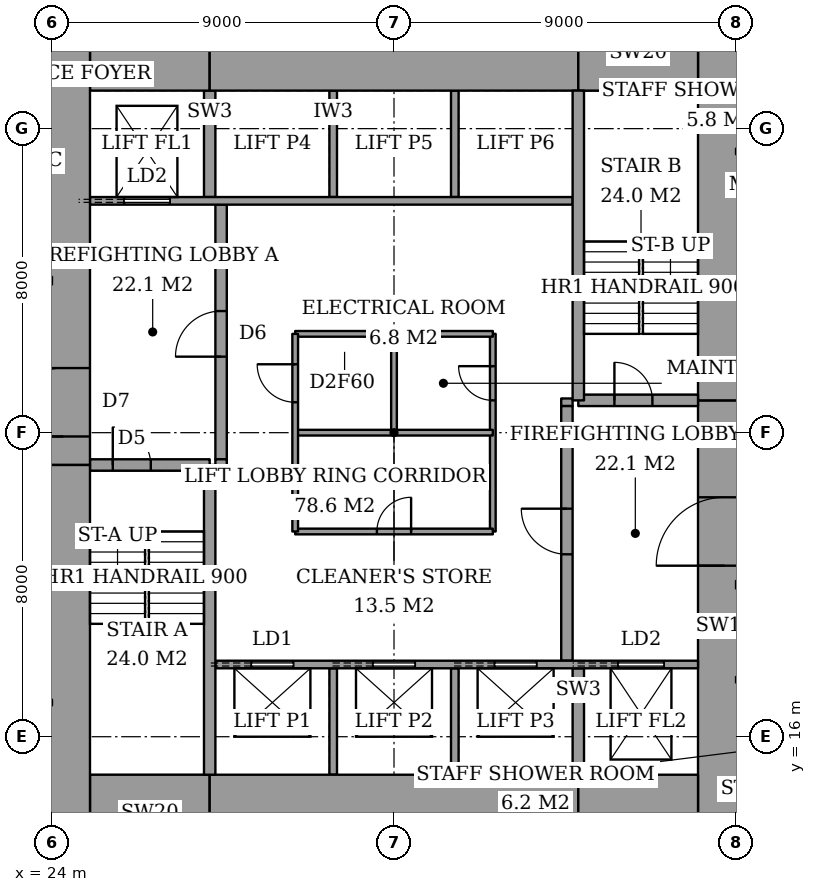
"""IFC4 building model, lengths in metres.
Left out: names, types, materials, properties, quantities, classifications, styles, units other than length and angle.
Written with IfcOpenShell. Run it as: python <this file> out.ifc"""

import sys

from ifc_helpers import new_model, si_unit, direction, frame, frame_2d, origin, place, context, subcontext, project, spatial, rectangle, extrude, element, fill, save


model = new_model("IFC4")
c1 = context("Model", 3, precision=1e-05, world=origin(), true_north=direction((0.0, 1.0)))
c2 = subcontext(c1, "Body", "Model", "MODEL_VIEW")
j1 = project(units=[si_unit("LENGTHUNIT", "METRE"), si_unit("PLANEANGLEUNIT", "RADIAN")], contexts=[c1])
p1 = place(None, origin())
s1 = spatial("IfcSite", under=j1, at=p1, CompositionType="ELEMENT")
p2 = place(p1, origin())
s2 = spatial("IfcBuilding", under=s1, at=p2, CompositionType="ELEMENT")
p3 = place(p2, frame((0.0, 0.0, 164.6)))
s3 = spatial("IfcBuildingStorey", under=s2, at=p3, CompositionType="ELEMENT", Elevation=164.6)
p4 = place(p3, frame((25.0, 14.0, 0.0), z_axis=(0.0, 0.0, 1.0), x_axis=(1.0, 0.0, 0.0)))
e1 = element("IfcWall", 1, at=p4, inside=s3, PredefinedType="SHEAR", context=c2, shape_type="SweptSolid", body=[
    extrude(rectangle(XDim=3.15, YDim=2.0, at=frame_2d((1.575, 0.0))), origin(), (0.0, 0.0, 1.0), 3.6),
])
p5 = place(p3, frame((28.15, 14.0, 0.0), z_axis=(0.0, 0.0, 1.0), x_axis=(1.0, 0.0, 0.0)))
e2 = element("IfcWall", 2, at=p5, inside=s3, PredefinedType="SHEAR", context=c2, shape_type="SweptSolid", body=[
    extrude(rectangle(XDim=9.7, YDim=2.0, at=frame_2d((4.85, 0.0))), origin(), (0.0, 0.0, 1.0), 3.6),
])
for number, where, z_axis, x_axis in (
    (3, (37.85, 14.0, 0.0), (0.0, 0.0, 1.0), (1.0, 0.0, 0.0)),
    (4, (25.0, 34.0, 0.0), (0.0, 0.0, 1.0), (1.0, 0.0, 0.0)),
):
    element("IfcWall", number, at=place(p3, frame(where, z_axis=z_axis, x_axis=x_axis)), inside=s3, PredefinedType="SHEAR", context=c2, shape_type="SweptSolid", body=[
        extrude(rectangle(XDim=3.15, YDim=2.0, at=frame_2d((1.575, 0.0))), origin(), (0.0, 0.0, 1.0), 3.6),
    ])
p6 = place(p3, frame((28.15, 34.0, 0.0), z_axis=(0.0, 0.0, 1.0), x_axis=(1.0, 0.0, 0.0)))
e5 = element("IfcWall", 5, at=p6, inside=s3, PredefinedType="SHEAR", context=c2, shape_type="SweptSolid", body=[
    extrude(rectangle(XDim=9.7, YDim=2.0, at=frame_2d((4.85, 0.0))), origin(), (0.0, 0.0, 1.0), 3.6),
])
p7 = place(p3, frame((37.85, 34.0, 0.0), z_axis=(0.0, 0.0, 1.0), x_axis=(1.0, 0.0, 0.0)))
e6 = element("IfcWall", 6, at=p7, inside=s3, PredefinedType="SHEAR", context=c2, shape_type="SweptSolid", body=[
    extrude(rectangle(XDim=3.15, YDim=2.0, at=frame_2d((1.575, 0.0))), origin(), (0.0, 0.0, 1.0), 3.6),
])
p8 = place(p3, frame((24.3, 13.0, 0.0), z_axis=(0.0, 0.0, 1.0), x_axis=(0.0, 1.0, 0.0)))
e7 = element("IfcWall", 7, at=p8, inside=s3, PredefinedType="SHEAR", context=c2, shape_type="SweptSolid", body=[
    extrude(rectangle(XDim=10.15, YDim=1.4, at=frame_2d((5.075, 0.0))), origin(), (0.0, 0.0, 1.0), 3.6),
])
p9 = place(p3, frame((24.3, 23.15, 0.0), z_axis=(0.0, 0.0, 1.0), x_axis=(0.0, 1.0, 0.0)))
e8 = element("IfcWall", 8, at=p9, inside=s3, PredefinedType="SHEAR", context=c2, shape_type="SweptSolid", body=[
    extrude(rectangle(XDim=11.85, YDim=1.4, at=frame_2d((5.925, 0.0))), origin(), (0.0, 0.0, 1.0), 3.6),
])
p10 = place(p9, frame((0.75, 0.0, 0.0)))
e9 = element("IfcOpeningElement", 9, at=p10, cuts=e8, PredefinedType="OPENING", context=c2, shape_type="SweptSolid", body=[
    extrude(rectangle(XDim=1.8, YDim=2.4, at=frame_2d((0.9, 1.2))), frame((0.0, 0.71, 0.0), z_axis=(0.0, -1.0, 0.0), x_axis=(1.0, 0.0, 0.0)), (0.0, 0.0, 1.0), 1.42),
])
p11 = place(p3, frame((41.7, 13.0, 0.0), z_axis=(0.0, 0.0, 1.0), x_axis=(0.0, 1.0, 0.0)))
e10 = element("IfcWall", 10, at=p11, inside=s3, PredefinedType="SHEAR", context=c2, shape_type="SweptSolid", body=[
    extrude(rectangle(XDim=11.85, YDim=1.4, at=frame_2d((5.925, 0.0))), origin(), (0.0, 0.0, 1.0), 3.6),
])
p12 = place(p11, frame((7.5, 0.0, 0.0)))
e11 = element("IfcOpeningElement", 11, at=p12, cuts=e10, PredefinedType="OPENING", context=c2, shape_type="SweptSolid", body=[
    extrude(rectangle(XDim=1.8, YDim=2.4, at=frame_2d((0.9, 1.2))), frame((0.0, 0.71, 0.0), z_axis=(0.0, -1.0, 0.0), x_axis=(1.0, 0.0, 0.0)), (0.0, 0.0, 1.0), 1.42),
])
p13 = place(p3, frame((41.7, 24.85, 0.0), z_axis=(0.0, 0.0, 1.0), x_axis=(0.0, 1.0, 0.0)))
e12 = element("IfcWall", 12, at=p13, inside=s3, PredefinedType="SHEAR", context=c2, shape_type="SweptSolid", body=[
    extrude(rectangle(XDim=10.15, YDim=1.4, at=frame_2d((5.075, 0.0))), origin(), (0.0, 0.0, 1.0), 3.6),
])
p14 = place(p3, frame((28.15, 15.0, 0.0), z_axis=(0.0, 0.0, 1.0), x_axis=(0.0, 1.0, 0.0)))
e13 = element("IfcWall", 13, at=p14, inside=s3, PredefinedType="SHEAR", context=c2, shape_type="SweptSolid", body=[
    extrude(rectangle(XDim=8.15, YDim=0.3, at=frame_2d((4.075, 0.0))), origin(), (0.0, 0.0, 1.0), 3.6),
])
p15 = place(p3, frame((25.0, 23.15, 0.0), z_axis=(0.0, 0.0, 1.0), x_axis=(1.0, 0.0, 0.0)))
e14 = element("IfcWall", 14, at=p15, inside=s3, PredefinedType="SHEAR", context=c2, shape_type="SweptSolid", body=[
    extrude(rectangle(XDim=3.15, YDim=0.3, at=frame_2d((1.575, 0.0))), origin(), (0.0, 0.0, 1.0), 3.6),
])
p16 = place(p15, frame((0.6, 0.0, 0.0)))
e15 = element("IfcOpeningElement", 15, at=p16, cuts=e14, PredefinedType="OPENING", context=c2, shape_type="SweptSolid", body=[
    extrude(rectangle(XDim=1.0, YDim=2.1, at=frame_2d((0.5, 1.05))), frame((0.0, 0.16, 0.0), z_axis=(0.0, -1.0, 0.0), x_axis=(1.0, 0.0, 0.0)), (0.0, 0.0, 1.0), 0.32),
])
p17 = place(p3, frame((37.85, 24.85, 0.0), z_axis=(0.0, 0.0, 1.0), x_axis=(0.0, 1.0, 0.0)))
e16 = element("IfcWall", 16, at=p17, inside=s3, PredefinedType="SHEAR", context=c2, shape_type="SweptSolid", body=[
    extrude(rectangle(XDim=8.15, YDim=0.3, at=frame_2d((4.075, 0.0))), origin(), (0.0, 0.0, 1.0), 3.6),
])
p18 = place(p3, frame((37.85, 24.85, 0.0), z_axis=(0.0, 0.0, 1.0), x_axis=(1.0, 0.0, 0.0)))
e17 = element("IfcWall", 17, at=p18, inside=s3, PredefinedType="SHEAR", context=c2, shape_type="SweptSolid", body=[
    extrude(rectangle(XDim=3.15, YDim=0.3, at=frame_2d((1.575, 0.0))), origin(), (0.0, 0.0, 1.0), 3.6),
])
p19 = place(p18, frame((0.95, 0.0, 0.0)))
e18 = element("IfcOpeningElement", 18, at=p19, cuts=e17, PredefinedType="OPENING", context=c2, shape_type="SweptSolid", body=[
    extrude(rectangle(XDim=1.0, YDim=2.1, at=frame_2d((0.5, 1.05))), frame((0.0, 0.16, 0.0), z_axis=(0.0, -1.0, 0.0), x_axis=(1.0, 0.0, 0.0)), (0.0, 0.0, 1.0), 0.32),
])
p20 = place(p3, frame((28.45, 23.3, 0.0), z_axis=(0.0, 0.0, 1.0), x_axis=(0.0, 1.0, 0.0)))
e19 = element("IfcWall", 19, at=p20, inside=s3, PredefinedType="PARTITIONING", context=c2, shape_type="SweptSolid", body=[
    extrude(rectangle(XDim=6.7, YDim=0.3, at=frame_2d((3.35, 0.0))), origin(), (0.0, 0.0, 1.0), 3.6),
])
p21 = place(p20, frame((2.7, 0.0, 0.0)))
e20 = element("IfcOpeningElement", 20, at=p21, cuts=e19, PredefinedType="OPENING", context=c2, shape_type="SweptSolid", body=[
    extrude(rectangle(XDim=1.2, YDim=2.1, at=frame_2d((0.6, 1.05))), frame((0.0, 0.16, 0.0), z_axis=(0.0, -1.0, 0.0), x_axis=(1.0, 0.0, 0.0)), (0.0, 0.0, 1.0), 0.32),
])
p22 = place(p3, frame((37.55, 18.0, 0.0), z_axis=(0.0, 0.0, 1.0), x_axis=(0.0, 1.0, 0.0)))
e21 = element("IfcWall", 21, at=p22, inside=s3, PredefinedType="PARTITIONING", context=c2, shape_type="SweptSolid", body=[
    extrude(rectangle(XDim=6.7, YDim=0.3, at=frame_2d((3.35, 0.0))), origin(), (0.0, 0.0, 1.0), 3.6),
])
p23 = place(p22, frame((2.8, 0.0, 0.0)))
e22 = element("IfcOpeningElement", 22, at=p23, cuts=e21, PredefinedType="OPENING", context=c2, shape_type="SweptSolid", body=[
    extrude(rectangle(XDim=1.2, YDim=2.1, at=frame_2d((0.6, 1.05))), frame((0.0, 0.16, 0.0), z_axis=(0.0, -1.0, 0.0), x_axis=(1.0, 0.0, 0.0)), (0.0, 0.0, 1.0), 0.32),
])
p24 = place(p3, frame((28.3, 17.9, 0.0), z_axis=(0.0, 0.0, 1.0), x_axis=(1.0, 0.0, 0.0)))
e23 = element("IfcWall", 23, at=p24, inside=s3, PredefinedType="PARTITIONING", context=c2, shape_type="SweptSolid", body=[
    extrude(rectangle(XDim=12.7, YDim=0.2, at=frame_2d((6.35, 0.0))), origin(), (0.0, 0.0, 1.0), 3.6),
])
p25 = place(p24, frame((0.95, 0.0, 0.0)))
e24 = element("IfcOpeningElement", 24, at=p25, cuts=e23, PredefinedType="OPENING", context=c2, shape_type="SweptSolid", body=[
    extrude(rectangle(XDim=1.1, YDim=2.1, at=frame_2d((0.55, 1.05))), frame((0.0, 0.11, 0.0), z_axis=(0.0, -1.0, 0.0), x_axis=(1.0, 0.0, 0.0)), (0.0, 0.0, 1.0), 0.22),
])
p26 = place(p24, frame((4.15, 0.0, 0.0)))
e25 = element("IfcOpeningElement", 25, at=p26, cuts=e23, PredefinedType="OPENING", context=c2, shape_type="SweptSolid", body=[
    extrude(rectangle(XDim=1.1, YDim=2.1, at=frame_2d((0.55, 1.05))), frame((0.0, 0.11, 0.0), z_axis=(0.0, -1.0, 0.0), x_axis=(1.0, 0.0, 0.0)), (0.0, 0.0, 1.0), 0.22),
])
p27 = place(p24, frame((7.35, 0.0, 0.0)))
e26 = element("IfcOpeningElement", 26, at=p27, cuts=e23, PredefinedType="OPENING", context=c2, shape_type="SweptSolid", body=[
    extrude(rectangle(XDim=1.1, YDim=2.1, at=frame_2d((0.55, 1.05))), frame((0.0, 0.11, 0.0), z_axis=(0.0, -1.0, 0.0), x_axis=(1.0, 0.0, 0.0)), (0.0, 0.0, 1.0), 0.22),
])
p28 = place(p24, frame((10.6, 0.0, 0.0)))
e27 = element("IfcOpeningElement", 27, at=p28, cuts=e23, PredefinedType="OPENING", context=c2, shape_type="SweptSolid", body=[
    extrude(rectangle(XDim=1.2, YDim=2.1, at=frame_2d((0.6, 1.05))), frame((0.0, 0.11, 0.0), z_axis=(0.0, -1.0, 0.0), x_axis=(1.0, 0.0, 0.0)), (0.0, 0.0, 1.0), 0.22),
])
p29 = place(p3, frame((25.0, 30.1, 0.0), z_axis=(0.0, 0.0, 1.0), x_axis=(1.0, 0.0, 0.0)))
e28 = element("IfcWall", 28, at=p29, inside=s3, PredefinedType="PARTITIONING", context=c2, shape_type="SweptSolid", body=[
    extrude(rectangle(XDim=12.7, YDim=0.2, at=frame_2d((6.35, 0.0))), origin(), (0.0, 0.0, 1.0), 3.6),
])
p30 = place(p29, frame((0.9, 0.0, 0.0)))
e29 = element("IfcOpeningElement", 29, at=p30, cuts=e28, PredefinedType="OPENING", context=c2, shape_type="SweptSolid", body=[
    extrude(rectangle(XDim=1.2, YDim=2.1, at=frame_2d((0.6, 1.05))), frame((0.0, 0.11, 0.0), z_axis=(0.0, -1.0, 0.0), x_axis=(1.0, 0.0, 0.0)), (0.0, 0.0, 1.0), 0.22),
])
for number, where, z_axis, x_axis in (
    (30, (31.4, 15.0, 0.0), (0.0, 0.0, 1.0), (0.0, 1.0, 0.0)),
    (31, (34.6, 15.0, 0.0), (0.0, 0.0, 1.0), (0.0, 1.0, 0.0)),
):
    element("IfcWall", number, at=place(p3, frame(where, z_axis=z_axis, x_axis=x_axis)), inside=s3, PredefinedType="PARTITIONING", context=c2, shape_type="SweptSolid", body=[
        extrude(rectangle(XDim=2.8, YDim=0.2, at=frame_2d((1.4, 0.0))), origin(), (0.0, 0.0, 1.0), 3.6),
    ])
p31 = place(p3, frame((37.85, 15.0, 0.0), z_axis=(0.0, 0.0, 1.0), x_axis=(0.0, 1.0, 0.0)))
e32 = element("IfcWall", 32, at=p31, inside=s3, PredefinedType="SHEAR", context=c2, shape_type="SweptSolid", body=[
    extrude(rectangle(XDim=2.8, YDim=0.3, at=frame_2d((1.4, 0.0))), origin(), (0.0, 0.0, 1.0), 3.6),
])
for number, where, z_axis, x_axis in (
    (33, (31.4, 30.2, 0.0), (0.0, 0.0, 1.0), (0.0, 1.0, 0.0)),
    (34, (34.6, 30.2, 0.0), (0.0, 0.0, 1.0), (0.0, 1.0, 0.0)),
):
    element("IfcWall", number, at=place(p3, frame(where, z_axis=z_axis, x_axis=x_axis)), inside=s3, PredefinedType="PARTITIONING", context=c2, shape_type="SweptSolid", body=[
        extrude(rectangle(XDim=2.8, YDim=0.2, at=frame_2d((1.4, 0.0))), origin(), (0.0, 0.0, 1.0), 3.6),
    ])
p32 = place(p3, frame((28.15, 30.2, 0.0), z_axis=(0.0, 0.0, 1.0), x_axis=(0.0, 1.0, 0.0)))
e35 = element("IfcWall", 35, at=p32, inside=s3, PredefinedType="SHEAR", context=c2, shape_type="SweptSolid", body=[
    extrude(rectangle(XDim=2.8, YDim=0.3, at=frame_2d((1.4, 0.0))), origin(), (0.0, 0.0, 1.0), 3.6),
])
for number, where, z_axis, x_axis in (
    (36, (28.3, 23.2, 0.0), (0.0, 0.0, 1.0), (1.0, 0.0, 0.0)),
    (37, (37.4, 24.8, 0.0), (0.0, 0.0, 1.0), (1.0, 0.0, 0.0)),
):
    element("IfcWall", number, at=place(p3, frame(where, z_axis=z_axis, x_axis=x_axis)), inside=s3, PredefinedType="PARTITIONING", context=c2, shape_type="SweptSolid", body=[
        extrude(rectangle(XDim=0.3, YDim=0.2, at=frame_2d((0.15, 0.0))), origin(), (0.0, 0.0, 1.0), 3.6),
    ])
p33 = place(p3, frame((30.4, 21.4, 0.0), z_axis=(0.0, 0.0, 1.0), x_axis=(1.0, 0.0, 0.0)))
e38 = element("IfcWall", 38, at=p33, inside=s3, PredefinedType="PARTITIONING", context=c2, shape_type="SweptSolid", body=[
    extrude(rectangle(XDim=5.2, YDim=0.15, at=frame_2d((2.6, 0.0))), origin(), (0.0, 0.0, 1.0), 3.35),
])
p34 = place(p33, frame((2.15, 0.0, 0.0)))
e39 = element("IfcOpeningElement", 39, at=p34, cuts=e38, PredefinedType="OPENING", context=c2, shape_type="SweptSolid", body=[
    extrude(rectangle(XDim=0.9, YDim=2.1, at=frame_2d((0.45, 1.05))), frame((0.0, 0.085, 0.0), z_axis=(0.0, -1.0, 0.0), x_axis=(1.0, 0.0, 0.0)), (0.0, 0.0, 1.0), 0.17),
])
p35 = place(p3, frame((30.4, 26.6, 0.0), z_axis=(0.0, 0.0, 1.0), x_axis=(1.0, 0.0, 0.0)))
e40 = element("IfcWall", 40, at=p35, inside=s3, PredefinedType="PARTITIONING", context=c2, shape_type="SweptSolid", body=[
    extrude(rectangle(XDim=5.2, YDim=0.15, at=frame_2d((2.6, 0.0))), origin(), (0.0, 0.0, 1.0), 3.35),
])
p36 = place(p3, frame((30.4, 21.4, 0.0), z_axis=(0.0, 0.0, 1.0), x_axis=(0.0, 1.0, 0.0)))
e41 = element("IfcWall", 41, at=p36, inside=s3, PredefinedType="PARTITIONING", context=c2, shape_type="SweptSolid", body=[
    extrude(rectangle(XDim=5.2, YDim=0.15, at=frame_2d((2.6, 0.0))), origin(), (0.0, 0.0, 1.0), 3.35),
])
p37 = place(p36, frame((3.4, 0.0, 0.0)))
e42 = element("IfcOpeningElement", 42, at=p37, cuts=e41, PredefinedType="OPENING", context=c2, shape_type="SweptSolid", body=[
    extrude(rectangle(XDim=1.0, YDim=2.1, at=frame_2d((0.5, 1.05))), frame((0.0, 0.085, 0.0), z_axis=(0.0, -1.0, 0.0), x_axis=(1.0, 0.0, 0.0)), (0.0, 0.0, 1.0), 0.17),
])
p38 = place(p3, frame((35.6, 21.4, 0.0), z_axis=(0.0, 0.0, 1.0), x_axis=(0.0, 1.0, 0.0)))
e43 = element("IfcWall", 43, at=p38, inside=s3, PredefinedType="PARTITIONING", context=c2, shape_type="SweptSolid", body=[
    extrude(rectangle(XDim=5.2, YDim=0.15, at=frame_2d((2.6, 0.0))), origin(), (0.0, 0.0, 1.0), 3.35),
])
p39 = place(p38, frame((3.45, 0.0, 0.0)))
e44 = element("IfcOpeningElement", 44, at=p39, cuts=e43, PredefinedType="OPENING", context=c2, shape_type="SweptSolid", body=[
    extrude(rectangle(XDim=0.9, YDim=2.1, at=frame_2d((0.45, 1.05))), frame((0.0, 0.085, 0.0), z_axis=(0.0, -1.0, 0.0), x_axis=(1.0, 0.0, 0.0)), (0.0, 0.0, 1.0), 0.17),
])
p40 = place(p3, frame((30.4, 24.0, 0.0), z_axis=(0.0, 0.0, 1.0), x_axis=(1.0, 0.0, 0.0)))
e45 = element("IfcWall", 45, at=p40, inside=s3, PredefinedType="PARTITIONING", context=c2, shape_type="SweptSolid", body=[
    extrude(rectangle(XDim=5.2, YDim=0.15, at=frame_2d((2.6, 0.0))), origin(), (0.0, 0.0, 1.0), 3.35),
])
p41 = place(p3, frame((33.0, 24.0, 0.0), z_axis=(0.0, 0.0, 1.0), x_axis=(0.0, 1.0, 0.0)))
e46 = element("IfcWall", 46, at=p41, inside=s3, PredefinedType="PARTITIONING", context=c2, shape_type="SweptSolid", body=[
    extrude(rectangle(XDim=2.6, YDim=0.15, at=frame_2d((1.3, 0.0))), origin(), (0.0, 0.0, 1.0), 3.35),
])
p42 = place(p16, origin())
e47 = element("IfcDoor", 47, at=p42, inside=s3, OperationType="SINGLE_SWING_RIGHT", PredefinedType="DOOR", context=c2, shape_type="SweptSolid", body=[
    extrude(rectangle(XDim=1.0, YDim=2.1, at=frame_2d((0.5, 1.05))), frame((0.0, 0.025, 0.0), z_axis=(0.0, -1.0, 0.0), x_axis=(1.0, 0.0, 0.0)), (0.0, 0.0, 1.0), 0.05),
])
fill(e15, e47)
p43 = place(p19, origin())
e48 = element("IfcDoor", 48, at=p43, inside=s3, OperationType="SINGLE_SWING_RIGHT", PredefinedType="DOOR", context=c2, shape_type="SweptSolid", body=[
    extrude(rectangle(XDim=1.0, YDim=2.1, at=frame_2d((0.5, 1.05))), frame((0.0, 0.025, 0.0), z_axis=(0.0, -1.0, 0.0), x_axis=(1.0, 0.0, 0.0)), (0.0, 0.0, 1.0), 0.05),
])
fill(e18, e48)
p44 = place(p21, origin())
e49 = element("IfcDoor", 49, at=p44, inside=s3, OperationType="SINGLE_SWING_RIGHT", PredefinedType="DOOR", context=c2, shape_type="SweptSolid", body=[
    extrude(rectangle(XDim=1.2, YDim=2.1, at=frame_2d((0.6, 1.05))), frame((0.0, 0.025, 0.0), z_axis=(0.0, -1.0, 0.0), x_axis=(1.0, 0.0, 0.0)), (0.0, 0.0, 1.0), 0.05),
])
fill(e20, e49)
p45 = place(p23, origin())
e50 = element("IfcDoor", 50, at=p45, inside=s3, OperationType="SINGLE_SWING_LEFT", PredefinedType="DOOR", context=c2, shape_type="SweptSolid", body=[
    extrude(rectangle(XDim=1.2, YDim=2.1, at=frame_2d((0.6, 1.05))), frame((0.0, 0.025, 0.0), z_axis=(0.0, -1.0, 0.0), x_axis=(1.0, 0.0, 0.0)), (0.0, 0.0, 1.0), 0.05),
])
fill(e22, e50)
p46 = place(p10, origin())
e51 = element("IfcDoor", 51, at=p46, inside=s3, OperationType="DOUBLE_DOOR_DOUBLE_SWING", PredefinedType="DOOR", context=c2, shape_type="SweptSolid", body=[
    extrude(rectangle(XDim=1.8, YDim=2.4, at=frame_2d((0.9, 1.2))), frame((0.0, 0.025, 0.0), z_axis=(0.0, -1.0, 0.0), x_axis=(1.0, 0.0, 0.0)), (0.0, 0.0, 1.0), 0.05),
])
fill(e9, e51)
p47 = place(p12, origin())
e52 = element("IfcDoor", 52, at=p47, inside=s3, OperationType="DOUBLE_DOOR_DOUBLE_SWING", PredefinedType="DOOR", context=c2, shape_type="SweptSolid", body=[
    extrude(rectangle(XDim=1.8, YDim=2.4, at=frame_2d((0.9, 1.2))), frame((0.0, 0.025, 0.0), z_axis=(0.0, -1.0, 0.0), x_axis=(1.0, 0.0, 0.0)), (0.0, 0.0, 1.0), 0.05),
])
fill(e11, e52)
p48 = place(p34, origin())
e53 = element("IfcDoor", 53, at=p48, inside=s3, OperationType="SINGLE_SWING_LEFT", PredefinedType="DOOR", context=c2, shape_type="SweptSolid", body=[
    extrude(rectangle(XDim=0.9, YDim=2.1, at=frame_2d((0.45, 1.05))), frame((0.0, 0.025, 0.0), z_axis=(0.0, -1.0, 0.0), x_axis=(1.0, 0.0, 0.0)), (0.0, 0.0, 1.0), 0.05),
])
fill(e39, e53)
p49 = place(p37, origin())
e54 = element("IfcDoor", 54, at=p49, inside=s3, OperationType="SINGLE_SWING_LEFT", PredefinedType="DOOR", context=c2, shape_type="SweptSolid", body=[
    extrude(rectangle(XDim=1.0, YDim=2.1, at=frame_2d((0.5, 1.05))), frame((0.0, 0.025, 0.0), z_axis=(0.0, -1.0, 0.0), x_axis=(1.0, 0.0, 0.0)), (0.0, 0.0, 1.0), 0.05),
])
fill(e42, e54)
p50 = place(p39, origin())
e55 = element("IfcDoor", 55, at=p50, inside=s3, OperationType="SINGLE_SWING_LEFT", PredefinedType="DOOR", context=c2, shape_type="SweptSolid", body=[
    extrude(rectangle(XDim=0.9, YDim=2.1, at=frame_2d((0.45, 1.05))), frame((0.0, 0.025, 0.0), z_axis=(0.0, -1.0, 0.0), x_axis=(1.0, 0.0, 0.0)), (0.0, 0.0, 1.0), 0.05),
])
fill(e44, e55)
p51 = place(p25, origin())
e56 = element("IfcDoor", 56, at=p51, inside=s3, OperationType="SLIDING_TO_LEFT", PredefinedType="DOOR", context=c2, shape_type="SweptSolid", body=[
    extrude(rectangle(XDim=1.1, YDim=2.1, at=frame_2d((0.55, 1.05))), frame((0.0, 0.025, 0.0), z_axis=(0.0, -1.0, 0.0), x_axis=(1.0, 0.0, 0.0)), (0.0, 0.0, 1.0), 0.05),
])
fill(e24, e56)
p52 = place(p26, origin())
e57 = element("IfcDoor", 57, at=p52, inside=s3, OperationType="SLIDING_TO_LEFT", PredefinedType="DOOR", context=c2, shape_type="SweptSolid", body=[
    extrude(rectangle(XDim=1.1, YDim=2.1, at=frame_2d((0.55, 1.05))), frame((0.0, 0.025, 0.0), z_axis=(0.0, -1.0, 0.0), x_axis=(1.0, 0.0, 0.0)), (0.0, 0.0, 1.0), 0.05),
])
fill(e25, e57)
p53 = place(p27, origin())
e58 = element("IfcDoor", 58, at=p53, inside=s3, OperationType="SLIDING_TO_LEFT", PredefinedType="DOOR", context=c2, shape_type="SweptSolid", body=[
    extrude(rectangle(XDim=1.1, YDim=2.1, at=frame_2d((0.55, 1.05))), frame((0.0, 0.025, 0.0), z_axis=(0.0, -1.0, 0.0), x_axis=(1.0, 0.0, 0.0)), (0.0, 0.0, 1.0), 0.05),
])
fill(e26, e58)
p54 = place(p30, origin())
e59 = element("IfcDoor", 59, at=p54, inside=s3, OperationType="SLIDING_TO_LEFT", PredefinedType="DOOR", context=c2, shape_type="SweptSolid", body=[
    extrude(rectangle(XDim=1.2, YDim=2.1, at=frame_2d((0.6, 1.05))), frame((0.0, 0.025, 0.0), z_axis=(0.0, -1.0, 0.0), x_axis=(1.0, 0.0, 0.0)), (0.0, 0.0, 1.0), 0.05),
])
fill(e29, e59)
p55 = place(p28, origin())
e60 = element("IfcDoor", 60, at=p55, inside=s3, OperationType="SLIDING_TO_LEFT", PredefinedType="DOOR", context=c2, shape_type="SweptSolid", body=[
    extrude(rectangle(XDim=1.2, YDim=2.1, at=frame_2d((0.6, 1.05))), frame((0.0, 0.025, 0.0), z_axis=(0.0, -1.0, 0.0), x_axis=(1.0, 0.0, 0.0)), (0.0, 0.0, 1.0), 0.05),
])
fill(e27, e60)
save(model, sys.argv[1])
